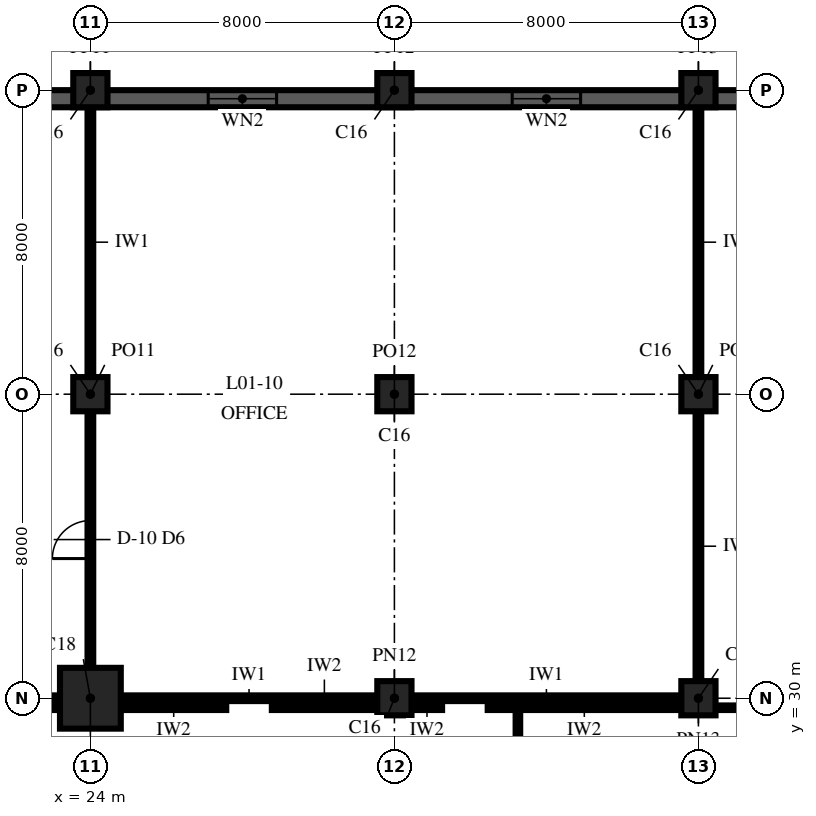
"""IFC4 building model, lengths in metres.
Left out: names, types, materials, properties, quantities, classifications, styles, units other than length and angle.
Written with IfcOpenShell. Run it as: python <this file> out.ifc"""

import sys

from ifc_helpers import new_model, si_unit, direction, frame, frame_2d, origin, origin_2d, place, context, subcontext, project, spatial, rectangle, extrude, element, fill, save


model = new_model("IFC4")
c1 = context("Model", 3, precision=1e-05, world=origin(), true_north=direction((0.0, 1.0)))
c2 = subcontext(c1, "Body", "Model", "MODEL_VIEW")
j1 = project(units=[si_unit("LENGTHUNIT", "METRE"), si_unit("PLANEANGLEUNIT", "RADIAN")], contexts=[c1])
p1 = place(None, origin())
s1 = spatial("IfcSite", under=j1, at=p1, CompositionType="ELEMENT")
p2 = place(p1, origin())
s2 = spatial("IfcBuilding", under=s1, at=p2, CompositionType="ELEMENT")
p3 = place(p2, frame((0.0, 0.0, 6.0)))
s3 = spatial("IfcBuildingStorey", under=s2, at=p3, CompositionType="ELEMENT", Elevation=6.0)
p4 = place(p3, frame((24.0, 30.0, 0.0), z_axis=(0.0, 0.0, 1.0), x_axis=(1.0, 0.0, 0.0)))
e1 = element("IfcColumn", 1, at=p4, inside=s3, PredefinedType="COLUMN", context=c2, shape_type="SweptSolid", body=[
    extrude(rectangle(XDim=1.6, YDim=1.6, at=origin_2d()), origin(), (0.0, 0.0, 1.0), 6.0),
])
for number, where, z_axis, x_axis in (
    (2, (24.0, 38.0, 0.0), (0.0, 0.0, 1.0), (1.0, 0.0, 0.0)),
    (3, (24.0, 46.0, 0.0), (0.0, 0.0, 1.0), (1.0, 0.0, 0.0)),
    (4, (32.0, 30.0, 0.0), (0.0, 0.0, 1.0), (1.0, 0.0, 0.0)),
    (5, (32.0, 38.0, 0.0), (0.0, 0.0, 1.0), (1.0, 0.0, 0.0)),
    (6, (32.0, 46.0, 0.0), (0.0, 0.0, 1.0), (1.0, 0.0, 0.0)),
    (7, (40.0, 30.0, 0.0), (0.0, 0.0, 1.0), (1.0, 0.0, 0.0)),
    (8, (40.0, 38.0, 0.0), (0.0, 0.0, 1.0), (1.0, 0.0, 0.0)),
    (9, (40.0, 46.0, 0.0), (0.0, 0.0, 1.0), (1.0, 0.0, 0.0)),
):
    element("IfcColumn", number, at=place(p3, frame(where, z_axis=z_axis, x_axis=x_axis)), inside=s3, PredefinedType="COLUMN", context=c2, shape_type="SweptSolid", body=[
        extrude(rectangle(XDim=0.9, YDim=0.9, at=origin_2d()), origin(), (0.0, 0.0, 1.0), 6.0),
    ])
p5 = place(p3, frame((56.0, 45.775, 0.0), z_axis=(0.0, 0.0, 1.0), x_axis=(-1.0, 0.0, 0.0)))
e10 = element("IfcWall", 10, at=p5, inside=s3, PredefinedType="SOLIDWALL", context=c2, shape_type="SweptSolid", body=[
    extrude(rectangle(XDim=90.0, YDim=0.45, at=frame_2d((45.0, 0.0))), origin(), (0.0, 0.0, 1.0), 6.0),
])
p6 = place(p5, frame((3.1, 0.0, 1.0)))
e11 = element("IfcOpeningElement", 11, at=p6, cuts=e10, PredefinedType="OPENING", context=c2, shape_type="SweptSolid", body=[
    extrude(rectangle(XDim=1.8, YDim=3.0, at=frame_2d((0.9, 1.5))), frame((0.0, 0.24, 0.0), z_axis=(0.0, -1.0, 0.0), x_axis=(1.0, 0.0, 0.0)), (0.0, 0.0, 1.0), 0.48),
])
p7 = place(p5, frame((11.1, 0.0, 1.0)))
e12 = element("IfcOpeningElement", 12, at=p7, cuts=e10, PredefinedType="OPENING", context=c2, shape_type="SweptSolid", body=[
    extrude(rectangle(XDim=1.8, YDim=3.0, at=frame_2d((0.9, 1.5))), frame((0.0, 0.24, 0.0), z_axis=(0.0, -1.0, 0.0), x_axis=(1.0, 0.0, 0.0)), (0.0, 0.0, 1.0), 0.48),
])
p8 = place(p5, frame((19.1, 0.0, 1.0)))
e13 = element("IfcOpeningElement", 13, at=p8, cuts=e10, PredefinedType="OPENING", context=c2, shape_type="SweptSolid", body=[
    extrude(rectangle(XDim=1.8, YDim=3.0, at=frame_2d((0.9, 1.5))), frame((0.0, 0.24, 0.0), z_axis=(0.0, -1.0, 0.0), x_axis=(1.0, 0.0, 0.0)), (0.0, 0.0, 1.0), 0.48),
])
p9 = place(p5, frame((27.1, 0.0, 1.0)))
e14 = element("IfcOpeningElement", 14, at=p9, cuts=e10, PredefinedType="OPENING", context=c2, shape_type="SweptSolid", body=[
    extrude(rectangle(XDim=1.8, YDim=3.0, at=frame_2d((0.9, 1.5))), frame((0.0, 0.24, 0.0), z_axis=(0.0, -1.0, 0.0), x_axis=(1.0, 0.0, 0.0)), (0.0, 0.0, 1.0), 0.48),
])
p10 = place(p5, frame((35.1, 0.0, 1.0)))
e15 = element("IfcOpeningElement", 15, at=p10, cuts=e10, PredefinedType="OPENING", context=c2, shape_type="SweptSolid", body=[
    extrude(rectangle(XDim=1.8, YDim=3.0, at=frame_2d((0.9, 1.5))), frame((0.0, 0.24, 0.0), z_axis=(0.0, -1.0, 0.0), x_axis=(1.0, 0.0, 0.0)), (0.0, 0.0, 1.0), 0.48),
])
p11 = place(p5, frame((43.1, 0.0, 1.0)))
e16 = element("IfcOpeningElement", 16, at=p11, cuts=e10, PredefinedType="OPENING", context=c2, shape_type="SweptSolid", body=[
    extrude(rectangle(XDim=1.8, YDim=3.0, at=frame_2d((0.9, 1.5))), frame((0.0, 0.24, 0.0), z_axis=(0.0, -1.0, 0.0), x_axis=(1.0, 0.0, 0.0)), (0.0, 0.0, 1.0), 0.48),
])
p12 = place(p5, frame((51.1, 0.0, 1.0)))
e17 = element("IfcOpeningElement", 17, at=p12, cuts=e10, PredefinedType="OPENING", context=c2, shape_type="SweptSolid", body=[
    extrude(rectangle(XDim=1.8, YDim=3.0, at=frame_2d((0.9, 1.5))), frame((0.0, 0.24, 0.0), z_axis=(0.0, -1.0, 0.0), x_axis=(1.0, 0.0, 0.0)), (0.0, 0.0, 1.0), 0.48),
])
p13 = place(p5, frame((59.1, 0.0, 1.0)))
e18 = element("IfcOpeningElement", 18, at=p13, cuts=e10, PredefinedType="OPENING", context=c2, shape_type="SweptSolid", body=[
    extrude(rectangle(XDim=1.8, YDim=3.0, at=frame_2d((0.9, 1.5))), frame((0.0, 0.24, 0.0), z_axis=(0.0, -1.0, 0.0), x_axis=(1.0, 0.0, 0.0)), (0.0, 0.0, 1.0), 0.48),
])
p14 = place(p5, frame((67.1, 0.0, 1.0)))
e19 = element("IfcOpeningElement", 19, at=p14, cuts=e10, PredefinedType="OPENING", context=c2, shape_type="SweptSolid", body=[
    extrude(rectangle(XDim=1.8, YDim=3.0, at=frame_2d((0.9, 1.5))), frame((0.0, 0.24, 0.0), z_axis=(0.0, -1.0, 0.0), x_axis=(1.0, 0.0, 0.0)), (0.0, 0.0, 1.0), 0.48),
])
p15 = place(p5, frame((75.1, 0.0, 1.0)))
e20 = element("IfcOpeningElement", 20, at=p15, cuts=e10, PredefinedType="OPENING", context=c2, shape_type="SweptSolid", body=[
    extrude(rectangle(XDim=1.8, YDim=3.0, at=frame_2d((0.9, 1.5))), frame((0.0, 0.24, 0.0), z_axis=(0.0, -1.0, 0.0), x_axis=(1.0, 0.0, 0.0)), (0.0, 0.0, 1.0), 0.48),
])
p16 = place(p5, frame((83.1, 0.0, 1.0)))
e21 = element("IfcOpeningElement", 21, at=p16, cuts=e10, PredefinedType="OPENING", context=c2, shape_type="SweptSolid", body=[
    extrude(rectangle(XDim=1.8, YDim=3.0, at=frame_2d((0.9, 1.5))), frame((0.0, 0.24, 0.0), z_axis=(0.0, -1.0, 0.0), x_axis=(1.0, 0.0, 0.0)), (0.0, 0.0, 1.0), 0.48),
])
p17 = place(p3, frame((24.0, 30.81, 0.0), z_axis=(0.0, 0.0, 1.0), x_axis=(0.0, 1.0, 0.0)))
e22 = element("IfcWall", 22, at=p17, inside=s3, PredefinedType="PARTITIONING", context=c2, shape_type="SweptSolid", body=[
    extrude(rectangle(XDim=6.73, YDim=0.15, at=frame_2d((3.365, 0.0))), origin(), (0.0, 0.0, 1.0), 5.05),
])
p18 = place(p17, frame((2.865, 0.0, 0.0)))
e23 = element("IfcOpeningElement", 23, at=p18, cuts=e22, PredefinedType="OPENING", context=c2, shape_type="SweptSolid", body=[
    extrude(rectangle(XDim=1.0, YDim=2.1, at=frame_2d((0.5, 1.05))), frame((0.0, 0.09, 0.0), z_axis=(0.0, -1.0, 0.0), x_axis=(1.0, 0.0, 0.0)), (0.0, 0.0, 1.0), 0.18),
])
p19 = place(p3, frame((24.0, 38.46, 0.0), z_axis=(0.0, 0.0, 1.0), x_axis=(0.0, 1.0, 0.0)))
e24 = element("IfcWall", 24, at=p19, inside=s3, PredefinedType="PARTITIONING", context=c2, shape_type="SweptSolid", body=[
    extrude(rectangle(XDim=7.08, YDim=0.15, at=frame_2d((3.54, 0.0))), origin(), (0.0, 0.0, 1.0), 5.05),
])
p20 = place(p3, frame((35.25, 12.6, 0.0), z_axis=(0.0, 0.0, 1.0), x_axis=(0.0, 1.0, 0.0)))
e25 = element("IfcWall", 25, at=p20, inside=s3, PredefinedType="PARTITIONING", context=c2, shape_type="SweptSolid", body=[
    extrude(rectangle(XDim=17.15, YDim=0.12, at=frame_2d((8.575, 0.0))), origin(), (0.0, 0.0, 1.0), 5.7),
])
for number, where, z_axis, x_axis in (
    (26, (40.0, 30.46, 0.0), (0.0, 0.0, 1.0), (0.0, 1.0, 0.0)),
    (27, (40.0, 38.46, 0.0), (0.0, 0.0, 1.0), (0.0, 1.0, 0.0)),
):
    element("IfcWall", number, at=place(p3, frame(where, z_axis=z_axis, x_axis=x_axis)), inside=s3, PredefinedType="PARTITIONING", context=c2, shape_type="SweptSolid", body=[
        extrude(rectangle(XDim=7.08, YDim=0.15, at=frame_2d((3.54, 0.0))), origin(), (0.0, 0.0, 1.0), 5.05),
    ])
p21 = place(p3, frame((22.512, 29.75, 0.0), z_axis=(0.0, 0.0, 1.0), x_axis=(1.0, 0.0, 0.0)))
e28 = element("IfcWall", 28, at=p21, inside=s3, PredefinedType="PARTITIONING", context=c2, shape_type="SweptSolid", body=[
    extrude(rectangle(XDim=0.677, YDim=0.12, at=frame_2d((0.339, 0.0))), origin(), (0.0, 0.0, 1.0), 5.7),
])
p22 = place(p3, frame((24.81, 29.75, 0.0), z_axis=(0.0, 0.0, 1.0), x_axis=(1.0, 0.0, 0.0)))
e29 = element("IfcWall", 29, at=p22, inside=s3, PredefinedType="PARTITIONING", context=c2, shape_type="SweptSolid", body=[
    extrude(rectangle(XDim=2.765, YDim=0.12, at=frame_2d((1.382, 0.0))), origin(), (0.0, 0.0, 1.0), 5.05),
])
p23 = place(p3, frame((28.775, 29.75, 0.0), z_axis=(0.0, 0.0, 1.0), x_axis=(1.0, 0.0, 0.0)))
e30 = element("IfcWall", 30, at=p23, inside=s3, PredefinedType="PARTITIONING", context=c2, shape_type="SweptSolid", body=[
    extrude(rectangle(XDim=2.765, YDim=0.12, at=frame_2d((1.383, 0.0))), origin(), (0.0, 0.0, 1.0), 5.05),
])
p24 = place(p3, frame((32.46, 29.75, 0.0), z_axis=(0.0, 0.0, 1.0), x_axis=(1.0, 0.0, 0.0)))
e31 = element("IfcWall", 31, at=p24, inside=s3, PredefinedType="PARTITIONING", context=c2, shape_type="SweptSolid", body=[
    extrude(rectangle(XDim=0.795, YDim=0.12, at=frame_2d((0.397, 0.0))), origin(), (0.0, 0.0, 1.0), 5.05),
])
p25 = place(p3, frame((34.455, 29.75, 0.0), z_axis=(0.0, 0.0, 1.0), x_axis=(1.0, 0.0, 0.0)))
e32 = element("IfcWall", 32, at=p25, inside=s3, PredefinedType="PARTITIONING", context=c2, shape_type="SweptSolid", body=[
    extrude(rectangle(XDim=5.085, YDim=0.12, at=frame_2d((2.542, 0.0))), origin(), (0.0, 0.0, 1.0), 5.05),
])
p26 = place(p3, frame((40.46, 29.75, 0.0), z_axis=(0.0, 0.0, 1.0), x_axis=(1.0, 0.0, 0.0)))
e33 = element("IfcWall", 33, at=p26, inside=s3, PredefinedType="PARTITIONING", context=c2, shape_type="SweptSolid", body=[
    extrude(rectangle(XDim=1.107, YDim=0.12, at=frame_2d((0.554, 0.0))), origin(), (0.0, 0.0, 1.0), 5.7),
])
p27 = place(p3, frame((20.635, 30.0, 0.0), z_axis=(0.0, 0.0, 1.0), x_axis=(1.0, 0.0, 0.0)))
e34 = element("IfcWall", 34, at=p27, inside=s3, PredefinedType="PARTITIONING", context=c2, shape_type="SweptSolid", body=[
    extrude(rectangle(XDim=2.555, YDim=0.15, at=frame_2d((1.277, 0.0))), origin(), (0.0, 0.0, 1.0), 5.7),
])
p28 = place(p3, frame((24.81, 30.0, 0.0), z_axis=(0.0, 0.0, 1.0), x_axis=(1.0, 0.0, 0.0)))
e35 = element("IfcWall", 35, at=p28, inside=s3, PredefinedType="PARTITIONING", context=c2, shape_type="SweptSolid", body=[
    extrude(rectangle(XDim=6.73, YDim=0.15, at=frame_2d((3.365, 0.0))), origin(), (0.0, 0.0, 1.0), 5.05),
])
p29 = place(p3, frame((32.46, 30.0, 0.0), z_axis=(0.0, 0.0, 1.0), x_axis=(1.0, 0.0, 0.0)))
e36 = element("IfcWall", 36, at=p29, inside=s3, PredefinedType="PARTITIONING", context=c2, shape_type="SweptSolid", body=[
    extrude(rectangle(XDim=7.08, YDim=0.15, at=frame_2d((3.54, 0.0))), origin(), (0.0, 0.0, 1.0), 5.05),
])
p30 = place(p8, origin())
e37 = element("IfcWindow", 37, at=p30, inside=s3, PartitioningType="SINGLE_PANEL", PredefinedType="WINDOW", context=c2, shape_type="SweptSolid", body=[
    extrude(rectangle(XDim=1.8, YDim=3.0, at=frame_2d((0.9, 1.5))), frame((0.0, 0.03, 0.0), z_axis=(0.0, -1.0, 0.0), x_axis=(1.0, 0.0, 0.0)), (0.0, 0.0, 1.0), 0.06),
])
fill(e13, e37)
p31 = place(p9, origin())
e38 = element("IfcWindow", 38, at=p31, inside=s3, PartitioningType="SINGLE_PANEL", PredefinedType="WINDOW", context=c2, shape_type="SweptSolid", body=[
    extrude(rectangle(XDim=1.8, YDim=3.0, at=frame_2d((0.9, 1.5))), frame((0.0, 0.03, 0.0), z_axis=(0.0, -1.0, 0.0), x_axis=(1.0, 0.0, 0.0)), (0.0, 0.0, 1.0), 0.06),
])
fill(e14, e38)
p32 = place(p18, origin())
e39 = element("IfcDoor", 39, at=p32, inside=s3, OperationType="SINGLE_SWING_LEFT", PredefinedType="DOOR", context=c2, shape_type="SweptSolid", body=[
    extrude(rectangle(XDim=1.0, YDim=2.1, at=frame_2d((0.5, 1.05))), frame((0.0, 0.075, 0.0), z_axis=(0.0, -1.0, 0.0), x_axis=(1.0, 0.0, 0.0)), (0.0, 0.0, 1.0), 0.149),
])
fill(e23, e39)
save(model, sys.argv[1])
